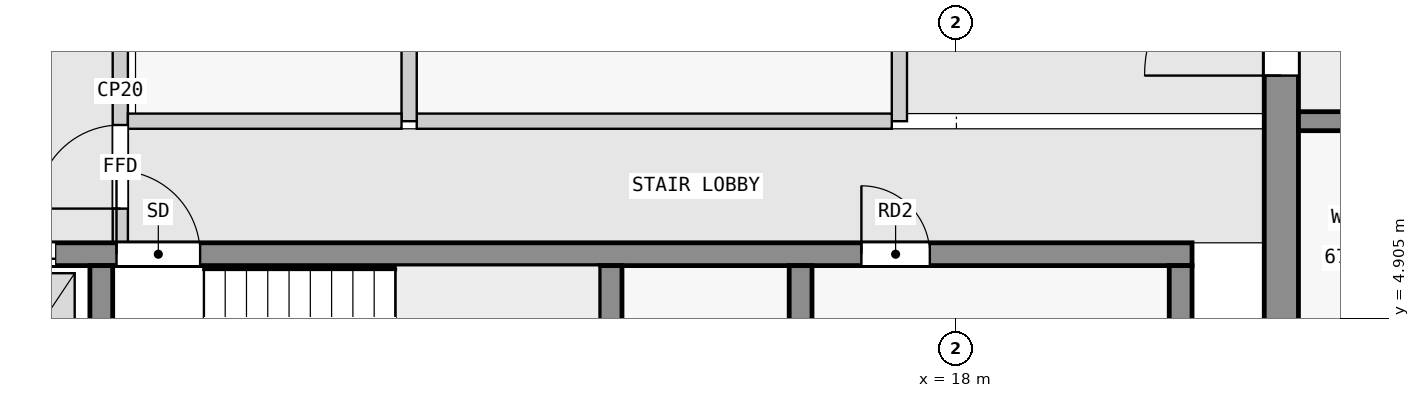
"""IFC4 building model, lengths in metres.
Left out: names, types, materials, properties, quantities, classifications, styles, units other than length and angle.
Written with IfcOpenShell. Run it as: python <this file> out.ifc"""

import sys

from ifc_helpers import new_model, si_unit, direction, frame, frame_2d, origin, place, context, subcontext, project, spatial, rectangle, extrude, element, fill, save


model = new_model("IFC4")
c1 = context("Model", 3, precision=1e-05, world=origin(), true_north=direction((0.0, 1.0)))
c2 = subcontext(c1, "Body", "Model", "MODEL_VIEW")
j1 = project(units=[si_unit("LENGTHUNIT", "METRE"), si_unit("PLANEANGLEUNIT", "RADIAN")], contexts=[c1])
p1 = place(None, origin())
s1 = spatial("IfcSite", under=j1, at=p1, CompositionType="ELEMENT")
p2 = place(p1, origin())
s2 = spatial("IfcBuilding", under=s1, at=p2, CompositionType="ELEMENT")
p3 = place(p2, frame((0.0, 0.0, 256.4)))
s3 = spatial("IfcBuildingStorey", under=s2, at=p3, CompositionType="ELEMENT", Elevation=256.4)
p4 = place(p3, frame((22.275, 2.5, 0.0), z_axis=(0.0, 0.0, 1.0), x_axis=(0.0, 1.0, 0.0)))
e1 = element("IfcWall", 1, at=p4, inside=s3, PredefinedType="SHEAR", context=c2, shape_type="SweptSolid", body=[
    extrude(rectangle(XDim=15.05, YDim=0.45, at=frame_2d((7.525, 0.0))), origin(), (0.0, 0.0, 1.0), 3.25),
])
p5 = place(p4, frame((5.6, 0.0, 0.0)))
e2 = element("IfcOpeningElement", 2, at=p5, cuts=e1, PredefinedType="OPENING", context=c2, shape_type="SweptSolid", body=[
    extrude(rectangle(XDim=1.8, YDim=2.1, at=frame_2d((0.9, 1.05))), frame((0.0, 0.235, 0.0), z_axis=(0.0, -1.0, 0.0), x_axis=(1.0, 0.0, 0.0)), (0.0, 0.0, 1.0), 0.47),
])
for number, where, z_axis, x_axis in (
    (3, (6.75, 2.8, 0.0), (0.0, 0.0, 1.0), (0.0, 1.0, 0.0)),
    (4, (13.45, 2.8, 0.0), (0.0, 0.0, 1.0), (0.0, 1.0, 0.0)),
    (5, (20.95, 2.8, 0.0), (0.0, 0.0, 1.0), (0.0, 1.0, 0.0)),
):
    element("IfcWall", number, at=place(p3, frame(where, z_axis=z_axis, x_axis=x_axis)), inside=s3, PredefinedType="SHEAR", context=c2, shape_type="SweptSolid", body=[
        extrude(rectangle(XDim=2.8, YDim=0.3, at=frame_2d((1.4, 0.0))), origin(), (0.0, 0.0, 1.0), 3.25),
    ])
p6 = place(p3, frame((2.3, 5.75, 0.0), z_axis=(0.0, 0.0, 1.0), x_axis=(1.0, 0.0, 0.0)))
e6 = element("IfcWall", 6, at=p6, inside=s3, PredefinedType="SHEAR", context=c2, shape_type="SweptSolid", body=[
    extrude(rectangle(XDim=18.8, YDim=0.3, at=frame_2d((9.4, 0.0))), origin(), (0.0, 0.0, 1.0), 3.25),
])
p7 = place(p6, frame((4.65, 0.0, 0.0)))
e7 = element("IfcOpeningElement", 7, at=p7, cuts=e6, PredefinedType="OPENING", context=c2, shape_type="SweptSolid", body=[
    extrude(rectangle(XDim=1.1, YDim=2.1, at=frame_2d((0.55, 1.05))), frame((0.0, 0.16, 0.0), z_axis=(0.0, -1.0, 0.0), x_axis=(1.0, 0.0, 0.0)), (0.0, 0.0, 1.0), 0.32),
])
p8 = place(p6, frame((0.45, 0.0, 0.0)))
e8 = element("IfcOpeningElement", 8, at=p8, cuts=e6, PredefinedType="OPENING", context=c2, shape_type="SweptSolid", body=[
    extrude(rectangle(XDim=1.1, YDim=2.1, at=frame_2d((0.55, 1.05))), frame((0.0, 0.16, 0.0), z_axis=(0.0, -1.0, 0.0), x_axis=(1.0, 0.0, 0.0)), (0.0, 0.0, 1.0), 0.32),
])
p9 = place(p6, frame((2.75, 0.0, 0.0)))
e9 = element("IfcOpeningElement", 9, at=p9, cuts=e6, PredefinedType="OPENING", context=c2, shape_type="SweptSolid", body=[
    extrude(rectangle(XDim=1.1, YDim=2.1, at=frame_2d((0.55, 1.05))), frame((0.0, 0.16, 0.0), z_axis=(0.0, -1.0, 0.0), x_axis=(1.0, 0.0, 0.0)), (0.0, 0.0, 1.0), 0.32),
])
p10 = place(p6, frame((14.45, 0.0, 0.0)))
e10 = element("IfcOpeningElement", 10, at=p10, cuts=e6, PredefinedType="OPENING", context=c2, shape_type="SweptSolid", body=[
    extrude(rectangle(XDim=0.9, YDim=2.1, at=frame_2d((0.45, 1.05))), frame((0.0, 0.16, 0.0), z_axis=(0.0, -1.0, 0.0), x_axis=(1.0, 0.0, 0.0)), (0.0, 0.0, 1.0), 0.32),
])
p11 = place(p3, frame((22.5, 7.5, 0.0), z_axis=(0.0, 0.0, 1.0), x_axis=(1.0, 0.0, 0.0)))
e11 = element("IfcWall", 11, at=p11, inside=s3, PredefinedType="SHEAR", context=c2, shape_type="SweptSolid", body=[
    extrude(rectangle(XDim=22.5, YDim=0.25, at=frame_2d((11.25, 0.0))), origin(), (0.0, 0.0, 1.0), 3.25),
])
p12 = place(p11, frame((1.75, 0.0, 0.0)))
e12 = element("IfcOpeningElement", 12, at=p12, cuts=e11, PredefinedType="OPENING", context=c2, shape_type="SweptSolid", body=[
    extrude(rectangle(XDim=1.0, YDim=2.1, at=frame_2d((0.5, 1.05))), frame((0.0, 0.135, 0.0), z_axis=(0.0, -1.0, 0.0), x_axis=(1.0, 0.0, 0.0)), (0.0, 0.0, 1.0), 0.27),
])
p13 = place(p11, frame((5.85, 0.0, 0.0)))
e13 = element("IfcOpeningElement", 13, at=p13, cuts=e11, PredefinedType="OPENING", context=c2, shape_type="SweptSolid", body=[
    extrude(rectangle(XDim=1.8, YDim=2.1, at=frame_2d((0.9, 1.05))), frame((0.0, 0.135, 0.0), z_axis=(0.0, -1.0, 0.0), x_axis=(1.0, 0.0, 0.0)), (0.0, 0.0, 1.0), 0.27),
])
p14 = place(p11, frame((10.75, 0.0, 0.0)))
e14 = element("IfcOpeningElement", 14, at=p14, cuts=e11, PredefinedType="OPENING", context=c2, shape_type="SweptSolid", body=[
    extrude(rectangle(XDim=1.0, YDim=2.1, at=frame_2d((0.5, 1.05))), frame((0.0, 0.135, 0.0), z_axis=(0.0, -1.0, 0.0), x_axis=(1.0, 0.0, 0.0)), (0.0, 0.0, 1.0), 0.27),
])
p15 = place(p11, frame((15.25, 0.0, 0.0)))
e15 = element("IfcOpeningElement", 15, at=p15, cuts=e11, PredefinedType="OPENING", context=c2, shape_type="SweptSolid", body=[
    extrude(rectangle(XDim=1.0, YDim=2.1, at=frame_2d((0.5, 1.05))), frame((0.0, 0.135, 0.0), z_axis=(0.0, -1.0, 0.0), x_axis=(1.0, 0.0, 0.0)), (0.0, 0.0, 1.0), 0.27),
])
p16 = place(p11, frame((18.75, 0.0, 0.0)))
e16 = element("IfcOpeningElement", 16, at=p16, cuts=e11, PredefinedType="OPENING", context=c2, shape_type="SweptSolid", body=[
    extrude(rectangle(XDim=0.9, YDim=2.1, at=frame_2d((0.45, 1.05))), frame((0.0, 0.135, 0.0), z_axis=(0.0, -1.0, 0.0), x_axis=(1.0, 0.0, 0.0)), (0.0, 0.0, 1.0), 0.27),
])
p17 = place(p11, frame((20.95, 0.0, 0.0)))
e17 = element("IfcOpeningElement", 17, at=p17, cuts=e11, PredefinedType="OPENING", context=c2, shape_type="SweptSolid", body=[
    extrude(rectangle(XDim=1.0, YDim=2.1, at=frame_2d((0.5, 1.05))), frame((0.0, 0.135, 0.0), z_axis=(0.0, -1.0, 0.0), x_axis=(1.0, 0.0, 0.0)), (0.0, 0.0, 1.0), 0.27),
])
p18 = place(p3, frame((7.0, 5.9, 0.0), z_axis=(0.0, 0.0, 1.0), x_axis=(0.0, 1.0, 0.0)))
e18 = element("IfcWall", 18, at=p18, inside=s3, PredefinedType="PARTITIONING", context=c2, shape_type="SweptSolid", body=[
    extrude(rectangle(XDim=4.0, YDim=0.2, at=frame_2d((2.0, 0.0))), origin(), (0.0, 0.0, 1.0), 3.25),
])
p19 = place(p18, frame((0.45, 0.0, 0.0)))
e19 = element("IfcOpeningElement", 19, at=p19, cuts=e18, PredefinedType="OPENING", context=c2, shape_type="SweptSolid", body=[
    extrude(rectangle(XDim=1.1, YDim=2.1, at=frame_2d((0.55, 1.05))), frame((0.0, 0.11, 0.0), z_axis=(0.0, -1.0, 0.0), x_axis=(1.0, 0.0, 0.0)), (0.0, 0.0, 1.0), 0.22),
])
p20 = place(p3, frame((7.1, 7.5, 0.0), z_axis=(0.0, 0.0, 1.0), x_axis=(1.0, 0.0, 0.0)))
e20 = element("IfcWall", 20, at=p20, inside=s3, PredefinedType="PARTITIONING", context=c2, shape_type="SweptSolid", body=[
    extrude(rectangle(XDim=3.6, YDim=0.2, at=frame_2d((1.8, 0.0))), origin(), (0.0, 0.0, 1.0), 3.25),
])
p21 = place(p3, frame((10.8, 7.5, 0.0), z_axis=(0.0, 0.0, 1.0), x_axis=(0.0, 1.0, 0.0)))
e21 = element("IfcWall", 21, at=p21, inside=s3, PredefinedType="PARTITIONING", context=c2, shape_type="SweptSolid", body=[
    extrude(rectangle(XDim=4.7, YDim=0.2, at=frame_2d((2.35, 0.0))), origin(), (0.0, 0.0, 1.0), 3.25),
])
p22 = place(p3, frame((10.9, 7.5, 0.0), z_axis=(0.0, 0.0, 1.0), x_axis=(1.0, 0.0, 0.0)))
e22 = element("IfcWall", 22, at=p22, inside=s3, PredefinedType="PARTITIONING", context=c2, shape_type="SweptSolid", body=[
    extrude(rectangle(XDim=6.25, YDim=0.2, at=frame_2d((3.125, 0.0))), origin(), (0.0, 0.0, 1.0), 3.25),
])
p23 = place(p3, frame((17.25, 7.5, 0.0), z_axis=(0.0, 0.0, 1.0), x_axis=(0.0, 1.0, 0.0)))
e23 = element("IfcWall", 23, at=p23, inside=s3, PredefinedType="PARTITIONING", context=c2, shape_type="SweptSolid", body=[
    extrude(rectangle(XDim=4.7, YDim=0.2, at=frame_2d((2.35, 0.0))), origin(), (0.0, 0.0, 1.0), 3.25),
])
p24 = place(p3, frame((15.95, 2.8, 0.0), z_axis=(0.0, 0.0, 1.0), x_axis=(0.0, 1.0, 0.0)))
e24 = element("IfcWall", 24, at=p24, inside=s3, PredefinedType="SHEAR", context=c2, shape_type="SweptSolid", body=[
    extrude(rectangle(XDim=2.8, YDim=0.3, at=frame_2d((1.4, 0.0))), origin(), (0.0, 0.0, 1.0), 3.25),
])
p25 = place(p19, origin())
e25 = element("IfcDoor", 25, at=p25, inside=s3, OperationType="SINGLE_SWING_LEFT", PredefinedType="DOOR", context=c2, shape_type="SweptSolid", body=[
    extrude(rectangle(XDim=1.1, YDim=2.1, at=frame_2d((0.55, 1.05))), frame((0.0, 0.025, 0.0), z_axis=(0.0, -1.0, 0.0), x_axis=(1.0, 0.0, 0.0)), (0.0, 0.0, 1.0), 0.05),
])
fill(e19, e25)
p26 = place(p7, origin())
e26 = element("IfcDoor", 26, at=p26, inside=s3, OperationType="SINGLE_SWING_LEFT", PredefinedType="DOOR", context=c2, shape_type="SweptSolid", body=[
    extrude(rectangle(XDim=1.1, YDim=2.1, at=frame_2d((0.55, 1.05))), frame((0.0, 0.025, 0.0), z_axis=(0.0, -1.0, 0.0), x_axis=(1.0, 0.0, 0.0)), (0.0, 0.0, 1.0), 0.05),
])
fill(e7, e26)
p27 = place(p9, origin())
e27 = element("IfcDoor", 27, at=p27, inside=s3, OperationType="DOUBLE_DOOR_SLIDING", PredefinedType="DOOR", context=c2, shape_type="SweptSolid", body=[
    extrude(rectangle(XDim=1.1, YDim=2.1, at=frame_2d((0.55, 1.05))), frame((0.0, 0.025, 0.0), z_axis=(0.0, -1.0, 0.0), x_axis=(1.0, 0.0, 0.0)), (0.0, 0.0, 1.0), 0.05),
])
fill(e9, e27)
p28 = place(p5, origin())
e28 = element("IfcDoor", 28, at=p28, inside=s3, OperationType="DOUBLE_DOOR_SINGLE_SWING", PredefinedType="DOOR", context=c2, shape_type="SweptSolid", body=[
    extrude(rectangle(XDim=1.8, YDim=2.1, at=frame_2d((0.9, 1.05))), frame((0.0, 0.025, 0.0), z_axis=(0.0, -1.0, 0.0), x_axis=(1.0, 0.0, 0.0)), (0.0, 0.0, 1.0), 0.05),
])
fill(e2, e28)
p29 = place(p10, origin())
e29 = element("IfcDoor", 29, at=p29, inside=s3, OperationType="SINGLE_SWING_LEFT", PredefinedType="DOOR", context=c2, shape_type="SweptSolid", body=[
    extrude(rectangle(XDim=0.9, YDim=2.1, at=frame_2d((0.45, 1.05))), frame((0.0, 0.025, 0.0), z_axis=(0.0, -1.0, 0.0), x_axis=(1.0, 0.0, 0.0)), (0.0, 0.0, 1.0), 0.05),
])
fill(e10, e29)
save(model, sys.argv[1])
